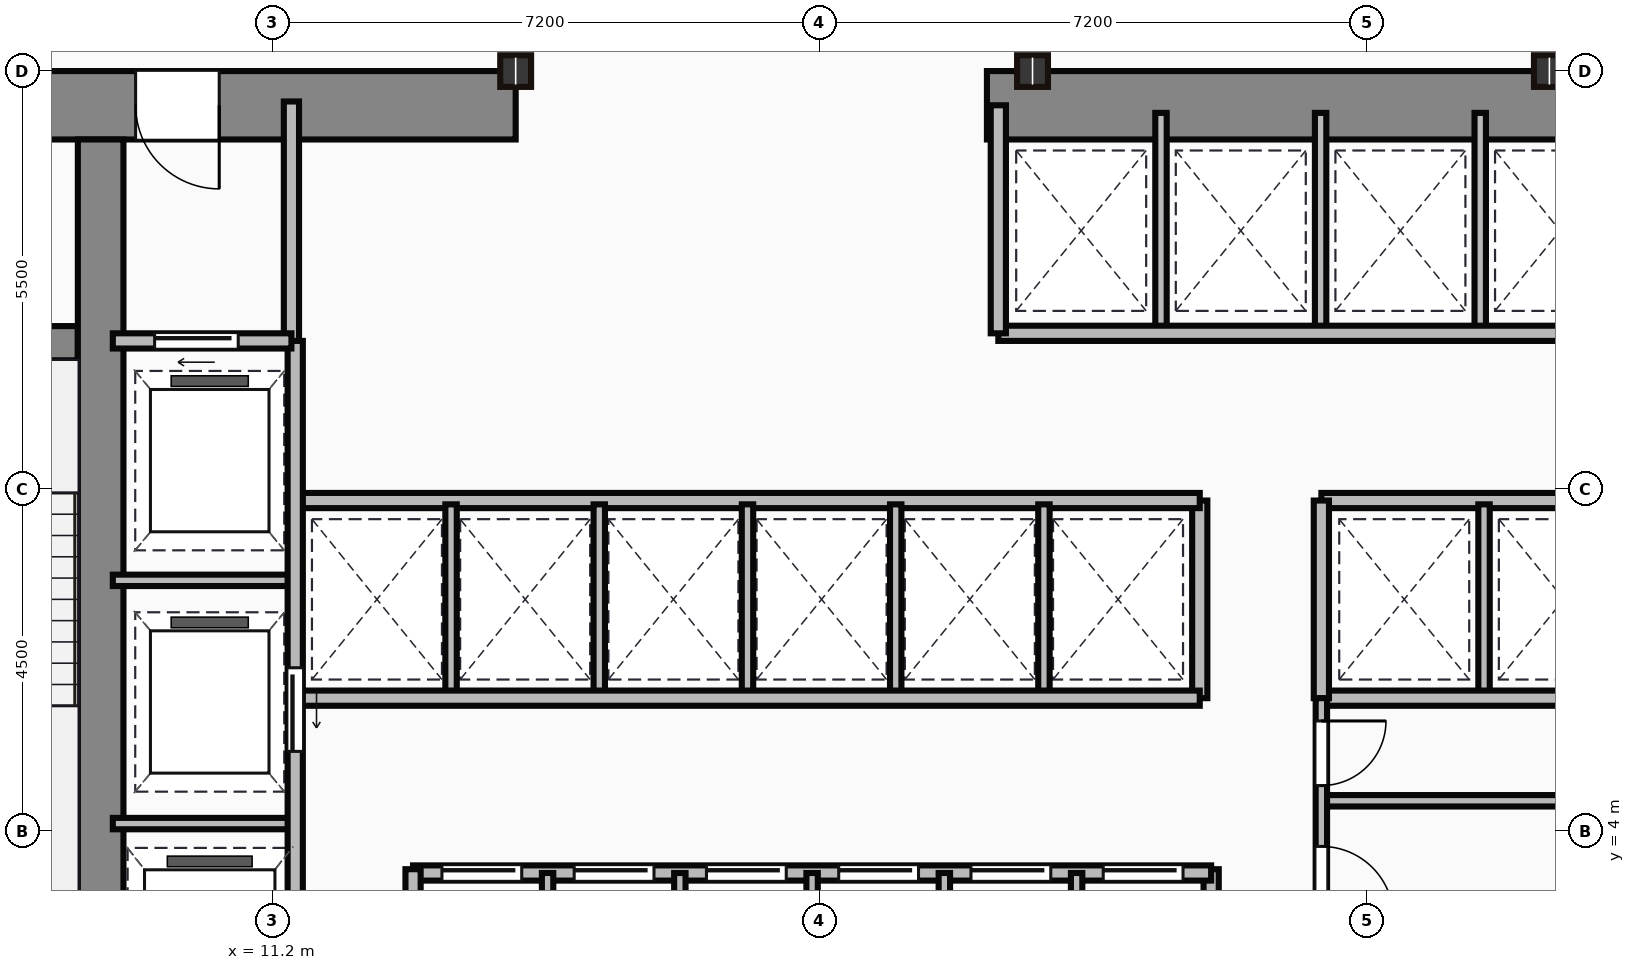
"""IFC4 building model, lengths in metres.
Left out: names, types, materials, properties, quantities, classifications, styles, units other than length and angle.
Written with IfcOpenShell. Run it as: python <this file> out.ifc"""

import sys

from ifc_helpers import new_model, si_unit, direction, frame, frame_2d, origin, origin_2d, place, context, subcontext, project, spatial, rectangle, i_section, extrude, source, transform, mapped, element, fill, save


model = new_model("IFC4")
c1 = context("Model", 3, precision=1e-05, world=origin(), true_north=direction((0.0, 1.0)))
c2 = subcontext(c1, "Body", "Model", "MODEL_VIEW")
j1 = project(units=[si_unit("LENGTHUNIT", "METRE"), si_unit("PLANEANGLEUNIT", "RADIAN")], contexts=[c1])
p1 = place(None, origin())
s1 = spatial("IfcSite", under=j1, at=p1, CompositionType="ELEMENT")
p2 = place(p1, origin())
s2 = spatial("IfcBuilding", under=s1, at=p2, CompositionType="ELEMENT")
p3 = place(p2, frame((0.0, 0.0, 58.05)))
s3 = spatial("IfcBuildingStorey", under=s2, at=p3, CompositionType="ELEMENT", Elevation=58.05)
m1 = source(origin(), c2, "Body", "SweptSolid", [
    extrude(rectangle(XDim=9.1, YDim=0.9, at=frame_2d((4.55, 0.0))), origin(), (0.0, 0.0, 1.0), 3.65),
])
p4 = place(p3, frame((5.3, 13.55, 0.0), z_axis=(0.0, 0.0, 1.0), x_axis=(1.0, 0.0, 0.0)))
e1 = element("IfcWall", 1, at=p4, inside=s3, PredefinedType="SHEAR", context=c2, shape_type="MappedRepresentation", body=[
    mapped(m1, transform((0.0, 0.0, 0.0))),
])
p5 = place(p4, frame((4.1, 0.0, 0.0)))
e2 = element("IfcOpeningElement", 2, at=p5, cuts=e1, PredefinedType="OPENING", context=c2, shape_type="SweptSolid", body=[
    extrude(rectangle(XDim=1.1, YDim=2.15, at=frame_2d((0.55, 1.075))), frame((0.0, 0.46, 0.0), z_axis=(0.0, -1.0, 0.0), x_axis=(1.0, 0.0, 0.0)), (0.0, 0.0, 1.0), 0.92),
])
m2 = source(origin(), c2, "Body", "SweptSolid", [
    extrude(rectangle(XDim=12.6, YDim=0.9, at=frame_2d((6.3, 0.0))), origin(), (0.0, 0.0, 1.0), 3.65),
])
p6 = place(p3, frame((20.6, 13.55, 0.0), z_axis=(0.0, 0.0, 1.0), x_axis=(1.0, 0.0, 0.0)))
e3 = element("IfcWall", 3, at=p6, inside=s3, PredefinedType="SHEAR", context=c2, shape_type="MappedRepresentation", body=[
    mapped(m2, transform((0.0, 0.0, 0.0))),
])
p7 = place(p6, frame((9.25, 0.0, 0.0)))
e4 = element("IfcOpeningElement", 4, at=p7, cuts=e3, PredefinedType="OPENING", context=c2, shape_type="SweptSolid", body=[
    extrude(rectangle(XDim=1.1, YDim=2.15, at=frame_2d((0.55, 1.075))), frame((0.0, 0.46, 0.0), z_axis=(0.0, -1.0, 0.0), x_axis=(1.0, 0.0, 0.0)), (0.0, 0.0, 1.0), 0.92),
])
m3 = source(origin(), c2, "Body", "SweptSolid", [
    extrude(rectangle(XDim=12.2, YDim=0.6, at=frame_2d((6.1, 0.0))), origin(), (0.0, 0.0, 1.0), 3.65),
])
p8 = place(p3, frame((8.94, 0.9, 0.0), z_axis=(0.0, 0.0, 1.0), x_axis=(0.0, 1.0, 0.0)))
e5 = element("IfcWall", 5, at=p8, inside=s3, PredefinedType="SHEAR", context=c2, shape_type="MappedRepresentation", body=[
    mapped(m3, transform((0.0, 0.0, 0.0))),
])
m4 = source(origin(), c2, "Body", "SweptSolid", [
    extrude(rectangle(XDim=3.39, YDim=0.45, at=frame_2d((1.695, 0.0))), origin(), (0.0, 0.0, 1.0), 3.65),
])
p9 = place(p3, frame((5.25, 10.42, 0.0), z_axis=(0.0, 0.0, 1.0), x_axis=(1.0, 0.0, 0.0)))
e6 = element("IfcWall", 6, at=p9, inside=s3, PredefinedType="SHEAR", context=c2, shape_type="MappedRepresentation", body=[
    mapped(m4, transform((0.0, 0.0, 0.0))),
])
p10 = place(p9, frame((1.05, 0.0, 0.0)))
e7 = element("IfcOpeningElement", 7, at=p10, cuts=e6, PredefinedType="OPENING", context=c2, shape_type="SweptSolid", body=[
    extrude(rectangle(XDim=1.1, YDim=2.15, at=frame_2d((0.55, 1.075))), frame((0.0, 0.235, 0.0), z_axis=(0.0, -1.0, 0.0), x_axis=(1.0, 0.0, 0.0)), (0.0, 0.0, 1.0), 0.47),
])
m5 = source(origin(), c2, "Body", "SweptSolid", [
    extrude(i_section(OverallWidth=0.406, OverallDepth=0.416, WebThickness=0.03, FlangeThickness=0.048, at=origin_2d()), origin(), (0.0, 0.0, 1.0), 3.65),
])
for number, where, z_axis, x_axis in (
    (8, (14.4, 14.0, 0.0), (0.0, 0.0, 1.0), (1.0, 0.0, 0.0)),
    (9, (21.2, 14.0, 0.0), (0.0, 0.0, 1.0), (1.0, 0.0, 0.0)),
    (10, (28.0, 14.0, 0.0), (0.0, 0.0, 1.0), (1.0, 0.0, 0.0)),
):
    element("IfcColumn", number, at=place(p3, frame(where, z_axis=z_axis, x_axis=x_axis)), inside=s3, PredefinedType="COLUMN", context=c2, shape_type="MappedRepresentation", body=[
        mapped(m5, transform((0.0, 0.0, 0.0))),
    ])
m6 = source(origin(), c2, "Body", "SweptSolid", [
    extrude(rectangle(XDim=3.18, YDim=0.2, at=frame_2d((1.59, 0.0))), origin(), (0.0, 0.0, 1.0), 3.4),
])
p11 = place(p3, frame((11.45, 10.42, 0.0), z_axis=(0.0, 0.0, 1.0), x_axis=(0.0, 1.0, 0.0)))
e11 = element("IfcWall", 11, at=p11, inside=s3, PredefinedType="PARTITIONING", context=c2, shape_type="MappedRepresentation", body=[
    mapped(m6, transform((0.0, 0.0, 0.0))),
])
m7 = source(origin(), c2, "Body", "SweptSolid", [
    extrude(rectangle(XDim=2.35, YDim=0.2, at=frame_2d((1.175, 0.0))), origin(), (0.0, 0.0, 1.0), 3.4),
])
p12 = place(p3, frame((9.1, 10.45, 0.0), z_axis=(0.0, 0.0, 1.0), x_axis=(1.0, 0.0, 0.0)))
e12 = element("IfcWall", 12, at=p12, inside=s3, PredefinedType="PARTITIONING", context=c2, shape_type="MappedRepresentation", body=[
    mapped(m7, transform((0.0, 0.0, 0.0))),
])
p13 = place(p12, frame((0.55, 0.0, 0.0)))
e13 = element("IfcOpeningElement", 13, at=p13, cuts=e12, PredefinedType="OPENING", context=c2, shape_type="SweptSolid", body=[
    extrude(rectangle(XDim=1.1, YDim=2.15, at=frame_2d((0.55, 1.075))), frame((0.0, 0.11, 0.0), z_axis=(0.0, -1.0, 0.0), x_axis=(1.0, 0.0, 0.0)), (0.0, 0.0, 1.0), 0.22),
])
m8 = source(origin(), c2, "Body", "SweptSolid", [
    extrude(rectangle(XDim=9.6, YDim=0.2, at=frame_2d((4.8, 0.0))), origin(), (0.0, 0.0, 1.0), 3.4),
])
p14 = place(p3, frame((11.5, 0.85, 0.0), z_axis=(0.0, 0.0, 1.0), x_axis=(0.0, 1.0, 0.0)))
e14 = element("IfcWall", 14, at=p14, inside=s3, PredefinedType="PARTITIONING", context=c2, shape_type="MappedRepresentation", body=[
    mapped(m8, transform((0.0, 0.0, 0.0))),
])
p15 = place(p14, frame((4.2, 0.0, 0.0)))
e15 = element("IfcOpeningElement", 15, at=p15, cuts=e14, PredefinedType="OPENING", context=c2, shape_type="SweptSolid", body=[
    extrude(rectangle(XDim=1.1, YDim=2.15, at=frame_2d((0.55, 1.075))), frame((0.0, 0.11, 0.0), z_axis=(0.0, -1.0, 0.0), x_axis=(1.0, 0.0, 0.0)), (0.0, 0.0, 1.0), 0.22),
])
p16 = place(p14, frame((0.9, 0.0, 0.0)))
e16 = element("IfcOpeningElement", 16, at=p16, cuts=e14, PredefinedType="OPENING", context=c2, shape_type="SweptSolid", body=[
    extrude(rectangle(XDim=1.2, YDim=2.15, at=frame_2d((0.6, 1.075))), frame((0.0, 0.11, 0.0), z_axis=(0.0, -1.0, 0.0), x_axis=(1.0, 0.0, 0.0)), (0.0, 0.0, 1.0), 0.22),
])
m9 = source(origin(), c2, "Body", "SweptSolid", [
    extrude(rectangle(XDim=2.4, YDim=0.15, at=frame_2d((1.2, 0.0))), origin(), (0.0, 0.0, 1.0), 3.4),
])
for number, where, z_axis, x_axis in (
    (17, (9.1, 4.1, 0.0), (0.0, 0.0, 1.0), (1.0, 0.0, 0.0)),
    (18, (9.1, 7.3, 0.0), (0.0, 0.0, 1.0), (1.0, 0.0, 0.0)),
):
    element("IfcWall", number, at=place(p3, frame(where, z_axis=z_axis, x_axis=x_axis)), inside=s3, PredefinedType="PARTITIONING", context=c2, shape_type="MappedRepresentation", body=[
        mapped(m9, transform((0.0, 0.0, 0.0))),
    ])
m10 = source(origin(), c2, "Body", "SweptSolid", [
    extrude(rectangle(XDim=2.65, YDim=0.2, at=frame_2d((1.325, 0.0))), origin(), (0.0, 0.0, 1.0), 3.4),
])
p17 = place(p3, frame((13.05, 0.85, 0.0), z_axis=(0.0, 0.0, 1.0), x_axis=(0.0, 1.0, 0.0)))
e19 = element("IfcWall", 19, at=p17, inside=s3, PredefinedType="PARTITIONING", context=c2, shape_type="MappedRepresentation", body=[
    mapped(m10, transform((0.0, 0.0, 0.0))),
])
m11 = source(origin(), c2, "Body", "SweptSolid", [
    extrude(rectangle(XDim=10.5, YDim=0.2, at=frame_2d((5.25, 0.0))), origin(), (0.0, 0.0, 1.0), 3.4),
])
p18 = place(p3, frame((13.05, 3.45, 0.0), z_axis=(0.0, 0.0, 1.0), x_axis=(1.0, 0.0, 0.0)))
e20 = element("IfcWall", 20, at=p18, inside=s3, PredefinedType="PARTITIONING", context=c2, shape_type="MappedRepresentation", body=[
    mapped(m11, transform((0.0, 0.0, 0.0))),
])
p19 = place(p18, frame((0.38, 0.0, 0.0)))
e21 = element("IfcOpeningElement", 21, at=p19, cuts=e20, PredefinedType="OPENING", context=c2, shape_type="SweptSolid", body=[
    extrude(rectangle(XDim=1.05, YDim=2.15, at=frame_2d((0.525, 1.075))), frame((0.0, 0.11, 0.0), z_axis=(0.0, -1.0, 0.0), x_axis=(1.0, 0.0, 0.0)), (0.0, 0.0, 1.0), 0.22),
])
p20 = place(p18, frame((2.12, 0.0, 0.0)))
e22 = element("IfcOpeningElement", 22, at=p20, cuts=e20, PredefinedType="OPENING", context=c2, shape_type="SweptSolid", body=[
    extrude(rectangle(XDim=1.05, YDim=2.15, at=frame_2d((0.525, 1.075))), frame((0.0, 0.11, 0.0), z_axis=(0.0, -1.0, 0.0), x_axis=(1.0, 0.0, 0.0)), (0.0, 0.0, 1.0), 0.22),
])
p21 = place(p18, frame((3.86, 0.0, 0.0)))
e23 = element("IfcOpeningElement", 23, at=p21, cuts=e20, PredefinedType="OPENING", context=c2, shape_type="SweptSolid", body=[
    extrude(rectangle(XDim=1.05, YDim=2.15, at=frame_2d((0.525, 1.075))), frame((0.0, 0.11, 0.0), z_axis=(0.0, -1.0, 0.0), x_axis=(1.0, 0.0, 0.0)), (0.0, 0.0, 1.0), 0.22),
])
p22 = place(p18, frame((5.6, 0.0, 0.0)))
e24 = element("IfcOpeningElement", 24, at=p22, cuts=e20, PredefinedType="OPENING", context=c2, shape_type="SweptSolid", body=[
    extrude(rectangle(XDim=1.05, YDim=2.15, at=frame_2d((0.525, 1.075))), frame((0.0, 0.11, 0.0), z_axis=(0.0, -1.0, 0.0), x_axis=(1.0, 0.0, 0.0)), (0.0, 0.0, 1.0), 0.22),
])
p23 = place(p18, frame((7.34, 0.0, 0.0)))
e25 = element("IfcOpeningElement", 25, at=p23, cuts=e20, PredefinedType="OPENING", context=c2, shape_type="SweptSolid", body=[
    extrude(rectangle(XDim=1.05, YDim=2.15, at=frame_2d((0.525, 1.075))), frame((0.0, 0.11, 0.0), z_axis=(0.0, -1.0, 0.0), x_axis=(1.0, 0.0, 0.0)), (0.0, 0.0, 1.0), 0.22),
])
p24 = place(p18, frame((9.08, 0.0, 0.0)))
e26 = element("IfcOpeningElement", 26, at=p24, cuts=e20, PredefinedType="OPENING", context=c2, shape_type="SweptSolid", body=[
    extrude(rectangle(XDim=1.05, YDim=2.15, at=frame_2d((0.525, 1.075))), frame((0.0, 0.11, 0.0), z_axis=(0.0, -1.0, 0.0), x_axis=(1.0, 0.0, 0.0)), (0.0, 0.0, 1.0), 0.22),
])
p25 = place(p3, frame((23.55, 0.85, 0.0), z_axis=(0.0, 0.0, 1.0), x_axis=(0.0, 1.0, 0.0)))
e27 = element("IfcWall", 27, at=p25, inside=s3, PredefinedType="PARTITIONING", context=c2, shape_type="MappedRepresentation", body=[
    mapped(m10, transform((0.0, 0.0, 0.0))),
])
m12 = source(origin(), c2, "Body", "SweptSolid", [
    extrude(rectangle(XDim=2.6, YDim=0.15, at=frame_2d((1.3, 0.0))), origin(), (0.0, 0.0, 1.0), 3.4),
])
for number, where, z_axis, x_axis in (
    (28, (14.82, 0.85, 0.0), (0.0, 0.0, 1.0), (0.0, 1.0, 0.0)),
    (29, (16.56, 0.85, 0.0), (0.0, 0.0, 1.0), (0.0, 1.0, 0.0)),
    (30, (18.3, 0.85, 0.0), (0.0, 0.0, 1.0), (0.0, 1.0, 0.0)),
    (31, (20.04, 0.85, 0.0), (0.0, 0.0, 1.0), (0.0, 1.0, 0.0)),
    (32, (21.78, 0.85, 0.0), (0.0, 0.0, 1.0), (0.0, 1.0, 0.0)),
):
    element("IfcWall", number, at=place(p3, frame(where, z_axis=z_axis, x_axis=x_axis)), inside=s3, PredefinedType="PARTITIONING", context=c2, shape_type="MappedRepresentation", body=[
        mapped(m12, transform((0.0, 0.0, 0.0))),
    ])
m13 = source(origin(), c2, "Body", "SweptSolid", [
    extrude(rectangle(XDim=11.85, YDim=0.2, at=frame_2d((5.925, 0.0))), origin(), (0.0, 0.0, 1.0), 3.4),
])
for number, where, z_axis, x_axis in (
    (33, (11.55, 5.75, 0.0), (0.0, 0.0, 1.0), (1.0, 0.0, 0.0)),
    (34, (11.55, 8.35, 0.0), (0.0, 0.0, 1.0), (1.0, 0.0, 0.0)),
):
    element("IfcWall", number, at=place(p3, frame(where, z_axis=z_axis, x_axis=x_axis)), inside=s3, PredefinedType="PARTITIONING", context=c2, shape_type="MappedRepresentation", body=[
        mapped(m13, transform((0.0, 0.0, 0.0))),
    ])
m14 = source(origin(), c2, "Body", "SweptSolid", [
    extrude(rectangle(XDim=2.6, YDim=0.2, at=frame_2d((1.3, 0.0))), origin(), (0.0, 0.0, 1.0), 3.4),
])
p26 = place(p3, frame((23.4, 5.75, 0.0), z_axis=(0.0, 0.0, 1.0), x_axis=(0.0, 1.0, 0.0)))
e35 = element("IfcWall", 35, at=p26, inside=s3, PredefinedType="PARTITIONING", context=c2, shape_type="MappedRepresentation", body=[
    mapped(m14, transform((0.0, 0.0, 0.0))),
])
m15 = source(origin(), c2, "Body", "SweptSolid", [
    extrude(rectangle(XDim=2.5, YDim=0.15, at=frame_2d((1.25, 0.0))), origin(), (0.0, 0.0, 1.0), 3.4),
])
for number, where, z_axis, x_axis in (
    (36, (13.55, 5.8, 0.0), (0.0, 0.0, 1.0), (0.0, 1.0, 0.0)),
    (37, (15.5, 5.8, 0.0), (0.0, 0.0, 1.0), (0.0, 1.0, 0.0)),
    (38, (17.45, 5.8, 0.0), (0.0, 0.0, 1.0), (0.0, 1.0, 0.0)),
    (39, (19.4, 5.8, 0.0), (0.0, 0.0, 1.0), (0.0, 1.0, 0.0)),
    (40, (21.35, 5.8, 0.0), (0.0, 0.0, 1.0), (0.0, 1.0, 0.0)),
):
    element("IfcWall", number, at=place(p3, frame(where, z_axis=z_axis, x_axis=x_axis)), inside=s3, PredefinedType="PARTITIONING", context=c2, shape_type="MappedRepresentation", body=[
        mapped(m15, transform((0.0, 0.0, 0.0))),
    ])
m16 = source(origin(), c2, "Body", "SweptSolid", [
    extrude(rectangle(XDim=8.8, YDim=0.2, at=frame_2d((4.4, 0.0))), origin(), (0.0, 0.0, 1.0), 3.4),
])
p27 = place(p3, frame((20.75, 10.55, 0.0), z_axis=(0.0, 0.0, 1.0), x_axis=(1.0, 0.0, 0.0)))
e41 = element("IfcWall", 41, at=p27, inside=s3, PredefinedType="PARTITIONING", context=c2, shape_type="MappedRepresentation", body=[
    mapped(m16, transform((0.0, 0.0, 0.0))),
])
m17 = source(origin(), c2, "Body", "SweptSolid", [
    extrude(rectangle(XDim=3.0, YDim=0.2, at=frame_2d((1.5, 0.0))), origin(), (0.0, 0.0, 1.0), 3.4),
])
p28 = place(p3, frame((20.75, 10.55, 0.0), z_axis=(0.0, 0.0, 1.0), x_axis=(0.0, 1.0, 0.0)))
e42 = element("IfcWall", 42, at=p28, inside=s3, PredefinedType="PARTITIONING", context=c2, shape_type="MappedRepresentation", body=[
    mapped(m17, transform((0.0, 0.0, 0.0))),
])
m18 = source(origin(), c2, "Body", "SweptSolid", [
    extrude(rectangle(XDim=2.85, YDim=0.15, at=frame_2d((1.425, 0.0))), origin(), (0.0, 0.0, 1.0), 3.4),
])
for number, where, z_axis, x_axis in (
    (43, (22.89, 10.6, 0.0), (0.0, 0.0, 1.0), (0.0, 1.0, 0.0)),
    (44, (24.99, 10.6, 0.0), (0.0, 0.0, 1.0), (0.0, 1.0, 0.0)),
    (45, (27.09, 10.6, 0.0), (0.0, 0.0, 1.0), (0.0, 1.0, 0.0)),
):
    element("IfcWall", number, at=place(p3, frame(where, z_axis=z_axis, x_axis=x_axis)), inside=s3, PredefinedType="PARTITIONING", context=c2, shape_type="MappedRepresentation", body=[
        mapped(m18, transform((0.0, 0.0, 0.0))),
    ])
m19 = source(origin(), c2, "Body", "SweptSolid", [
    extrude(rectangle(XDim=4.55, YDim=0.2, at=frame_2d((2.275, 0.0))), origin(), (0.0, 0.0, 1.0), 3.4),
])
for number, where, z_axis, x_axis in (
    (46, (25.0, 8.35, 0.0), (0.0, 0.0, 1.0), (1.0, 0.0, 0.0)),
    (47, (25.0, 5.75, 0.0), (0.0, 0.0, 1.0), (1.0, 0.0, 0.0)),
):
    element("IfcWall", number, at=place(p3, frame(where, z_axis=z_axis, x_axis=x_axis)), inside=s3, PredefinedType="PARTITIONING", context=c2, shape_type="MappedRepresentation", body=[
        mapped(m19, transform((0.0, 0.0, 0.0))),
    ])
p29 = place(p3, frame((25.0, 5.75, 0.0), z_axis=(0.0, 0.0, 1.0), x_axis=(0.0, 1.0, 0.0)))
e48 = element("IfcWall", 48, at=p29, inside=s3, PredefinedType="PARTITIONING", context=c2, shape_type="MappedRepresentation", body=[
    mapped(m14, transform((0.0, 0.0, 0.0))),
])
p30 = place(p3, frame((27.14, 5.8, 0.0), z_axis=(0.0, 0.0, 1.0), x_axis=(0.0, 1.0, 0.0)))
e49 = element("IfcWall", 49, at=p30, inside=s3, PredefinedType="PARTITIONING", context=c2, shape_type="MappedRepresentation", body=[
    mapped(m15, transform((0.0, 0.0, 0.0))),
])
m20 = source(origin(), c2, "Body", "SweptSolid", [
    extrude(rectangle(XDim=4.9, YDim=0.15, at=frame_2d((2.45, 0.0))), origin(), (0.0, 0.0, 1.0), 3.4),
])
p31 = place(p3, frame((25.0, 0.85, 0.0), z_axis=(0.0, 0.0, 1.0), x_axis=(0.0, 1.0, 0.0)))
e50 = element("IfcWall", 50, at=p31, inside=s3, PredefinedType="PARTITIONING", context=c2, shape_type="MappedRepresentation", body=[
    mapped(m20, transform((0.0, 0.0, 0.0))),
])
p32 = place(p31, frame((2.0, 0.0, 0.0)))
e51 = element("IfcOpeningElement", 51, at=p32, cuts=e50, PredefinedType="OPENING", context=c2, shape_type="SweptSolid", body=[
    extrude(rectangle(XDim=0.95, YDim=2.15, at=frame_2d((0.475, 1.075))), frame((0.0, 0.085, 0.0), z_axis=(0.0, -1.0, 0.0), x_axis=(1.0, 0.0, 0.0)), (0.0, 0.0, 1.0), 0.17),
])
p33 = place(p31, frame((3.75, 0.0, 0.0)))
e52 = element("IfcOpeningElement", 52, at=p33, cuts=e50, PredefinedType="OPENING", context=c2, shape_type="SweptSolid", body=[
    extrude(rectangle(XDim=0.85, YDim=2.15, at=frame_2d((0.425, 1.075))), frame((0.0, 0.085, 0.0), z_axis=(0.0, -1.0, 0.0), x_axis=(1.0, 0.0, 0.0)), (0.0, 0.0, 1.0), 0.17),
])
m21 = source(origin(), c2, "Body", "SweptSolid", [
    extrude(rectangle(XDim=4.55, YDim=0.15, at=frame_2d((2.275, 0.0))), origin(), (0.0, 0.0, 1.0), 3.4),
])
p34 = place(p3, frame((25.0, 4.4, 0.0), z_axis=(0.0, 0.0, 1.0), x_axis=(1.0, 0.0, 0.0)))
e53 = element("IfcWall", 53, at=p34, inside=s3, PredefinedType="PARTITIONING", context=c2, shape_type="MappedRepresentation", body=[
    mapped(m21, transform((0.0, 0.0, 0.0))),
])
m22 = source(origin(), c2, "Body", "SweptSolid", [
    extrude(rectangle(XDim=1.1, YDim=2.15, at=frame_2d((0.55, 1.075))), frame((0.0, 0.025, 0.0), z_axis=(0.0, -1.0, 0.0), x_axis=(1.0, 0.0, 0.0)), (0.0, 0.0, 1.0), 0.05),
])
p35 = place(p5, origin())
e54 = element("IfcDoor", 54, at=p35, inside=s3, OperationType="SINGLE_SWING_RIGHT", PredefinedType="DOOR", context=c2, shape_type="MappedRepresentation", body=[
    mapped(m22, transform((0.0, 0.0, 0.0))),
])
fill(e2, e54)
p36 = place(p13, origin())
e55 = element("IfcDoor", 55, at=p36, inside=s3, OperationType="SLIDING_TO_LEFT", PredefinedType="DOOR", context=c2, shape_type="MappedRepresentation", body=[
    mapped(m22, transform((0.0, 0.0, 0.0))),
])
fill(e13, e55)
p37 = place(p15, frame((1.1, 0.0, 0.0), z_axis=(0.0, 0.0, 1.0), x_axis=(-1.0, 0.0, 0.0)))
e56 = element("IfcDoor", 56, at=p37, inside=s3, OperationType="SLIDING_TO_LEFT", PredefinedType="DOOR", context=c2, shape_type="MappedRepresentation", body=[
    mapped(m22, transform((0.0, 0.0, 0.0))),
])
fill(e15, e56)
m23 = source(origin(), c2, "Body", "SweptSolid", [
    extrude(rectangle(XDim=1.05, YDim=2.15, at=frame_2d((0.525, 1.075))), frame((0.0, 0.025, 0.0), z_axis=(0.0, -1.0, 0.0), x_axis=(1.0, 0.0, 0.0)), (0.0, 0.0, 1.0), 0.05),
])
p38 = place(p19, origin())
e57 = element("IfcDoor", 57, at=p38, inside=s3, OperationType="SLIDING_TO_LEFT", PredefinedType="DOOR", context=c2, shape_type="MappedRepresentation", body=[
    mapped(m23, transform((0.0, 0.0, 0.0))),
])
fill(e21, e57)
p39 = place(p20, origin())
e58 = element("IfcDoor", 58, at=p39, inside=s3, OperationType="SLIDING_TO_LEFT", PredefinedType="DOOR", context=c2, shape_type="MappedRepresentation", body=[
    mapped(m23, transform((0.0, 0.0, 0.0))),
])
fill(e22, e58)
p40 = place(p21, origin())
e59 = element("IfcDoor", 59, at=p40, inside=s3, OperationType="SLIDING_TO_LEFT", PredefinedType="DOOR", context=c2, shape_type="MappedRepresentation", body=[
    mapped(m23, transform((0.0, 0.0, 0.0))),
])
fill(e23, e59)
p41 = place(p22, origin())
e60 = element("IfcDoor", 60, at=p41, inside=s3, OperationType="SLIDING_TO_LEFT", PredefinedType="DOOR", context=c2, shape_type="MappedRepresentation", body=[
    mapped(m23, transform((0.0, 0.0, 0.0))),
])
fill(e24, e60)
p42 = place(p23, origin())
e61 = element("IfcDoor", 61, at=p42, inside=s3, OperationType="SLIDING_TO_LEFT", PredefinedType="DOOR", context=c2, shape_type="MappedRepresentation", body=[
    mapped(m23, transform((0.0, 0.0, 0.0))),
])
fill(e25, e61)
p43 = place(p24, origin())
e62 = element("IfcDoor", 62, at=p43, inside=s3, OperationType="SLIDING_TO_LEFT", PredefinedType="DOOR", context=c2, shape_type="MappedRepresentation", body=[
    mapped(m23, transform((0.0, 0.0, 0.0))),
])
fill(e26, e62)
m24 = source(origin(), c2, "Body", "SweptSolid", [
    extrude(rectangle(XDim=0.95, YDim=2.15, at=frame_2d((0.475, 1.075))), frame((0.0, 0.025, 0.0), z_axis=(0.0, -1.0, 0.0), x_axis=(1.0, 0.0, 0.0)), (0.0, 0.0, 1.0), 0.05),
])
p44 = place(p32, origin())
e63 = element("IfcDoor", 63, at=p44, inside=s3, OperationType="SINGLE_SWING_LEFT", PredefinedType="DOOR", context=c2, shape_type="MappedRepresentation", body=[
    mapped(m24, transform((0.0, 0.0, 0.0))),
])
fill(e51, e63)
m25 = source(origin(), c2, "Body", "SweptSolid", [
    extrude(rectangle(XDim=0.85, YDim=2.15, at=frame_2d((0.425, 1.075))), frame((0.0, 0.025, 0.0), z_axis=(0.0, -1.0, 0.0), x_axis=(1.0, 0.0, 0.0)), (0.0, 0.0, 1.0), 0.05),
])
p45 = place(p33, origin())
e64 = element("IfcDoor", 64, at=p45, inside=s3, OperationType="SINGLE_SWING_RIGHT", PredefinedType="DOOR", context=c2, shape_type="MappedRepresentation", body=[
    mapped(m25, transform((0.0, 0.0, 0.0))),
])
fill(e52, e64)
save(model, sys.argv[1])
